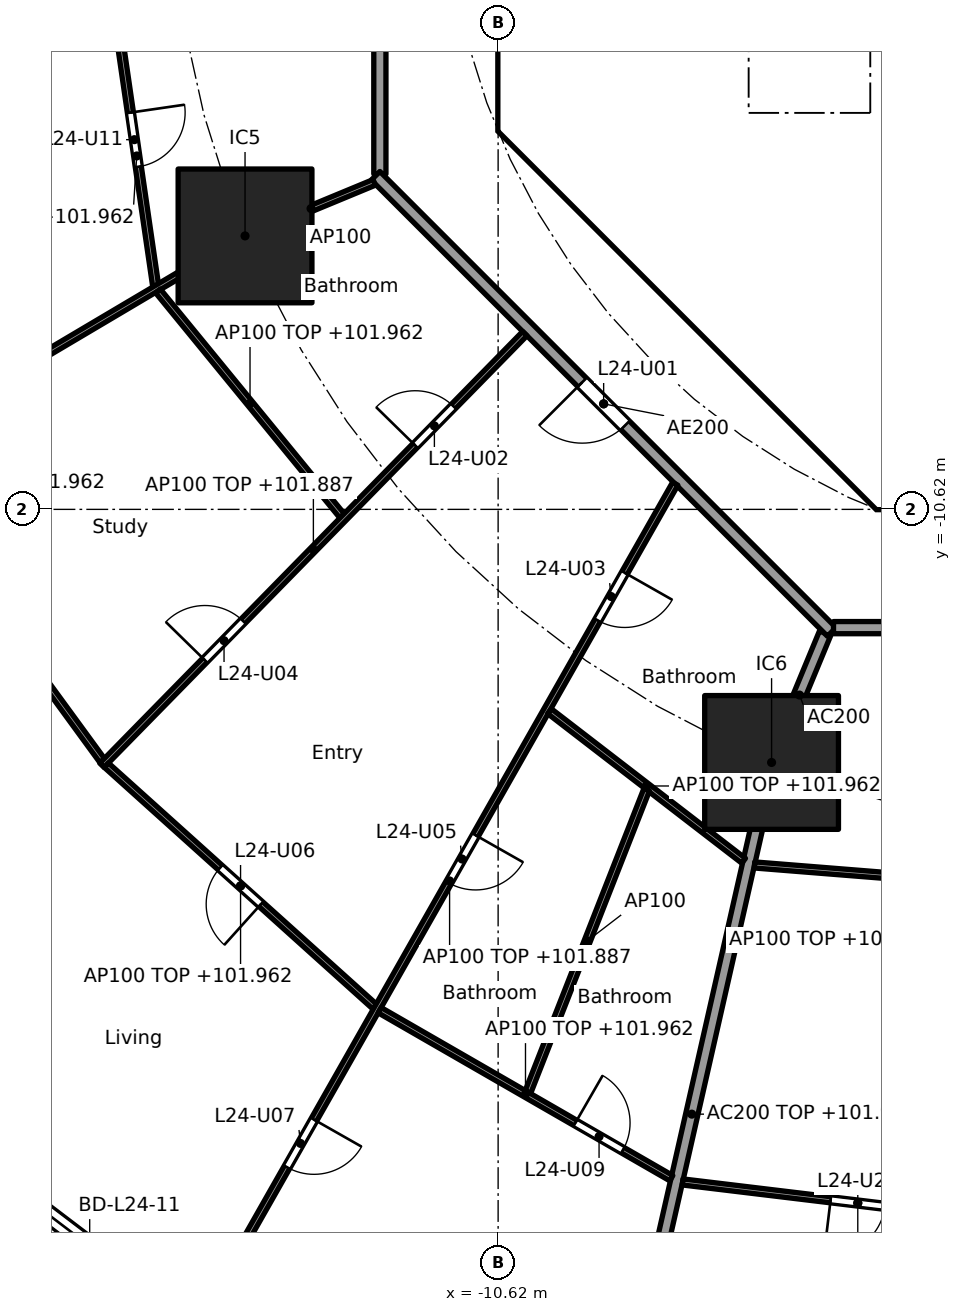
"""IFC4 building model, lengths in metres.
Left out: names, types, materials, properties, quantities, classifications, styles, units other than length and angle.
Written with IfcOpenShell. Run it as: python <this file> out.ifc"""

import sys

from ifc_helpers import new_model, si_unit, direction, frame, frame_2d, origin, origin_2d, place, context, subcontext, project, spatial, polyline, rectangle, outline, extrude, element, fill, save


model = new_model("IFC4")
c1 = context("Model", 3, precision=1e-05, world=origin(), true_north=direction((0.0, 1.0)))
c2 = subcontext(c1, "Body", "Model", "MODEL_VIEW")
j1 = project(units=[si_unit("LENGTHUNIT", "METRE"), si_unit("PLANEANGLEUNIT", "RADIAN")], contexts=[c1])
p1 = place(None, origin())
s1 = spatial("IfcSite", under=j1, at=p1, CompositionType="ELEMENT")
p2 = place(p1, origin())
s2 = spatial("IfcBuilding", under=s1, at=p2, CompositionType="ELEMENT")
p3 = place(p2, frame((0.0, 0.0, 99.2)))
s3 = spatial("IfcBuildingStorey", under=s2, at=p3, CompositionType="ELEMENT", Elevation=99.2)
for number, where, z_axis, x_axis in (
    (1, (-14.782, -6.123, 0.0), (0.0, 0.0, 1.0), (1.0, 0.0, 0.0)),
    (2, (-6.123, -14.782, 0.0), (0.0, 0.0, 1.0), (1.0, 0.0, 0.0)),
):
    element("IfcColumn", number, at=place(p3, frame(where, z_axis=z_axis, x_axis=x_axis)), inside=s3, PredefinedType="COLUMN", context=c2, shape_type="SweptSolid", body=[
        extrude(rectangle(XDim=2.2, YDim=2.2, at=origin_2d()), origin(), (0.0, 0.0, 1.0), 3.7),
    ])
p4 = place(p3, frame((-16.089, -23.682, 0.0), z_axis=(0.0, 0.0, 1.0), x_axis=(-0.796037575978, 0.605247203736, 0.0)))
e3 = element("IfcWall", 3, at=p4, inside=s3, PredefinedType="SOLIDWALL", context=c2, shape_type="SweptSolid", body=[
    extrude(rectangle(XDim=3.134, YDim=0.25, at=frame_2d((1.567, 0.0))), origin(), (0.0, 0.0, 1.0), 3.44),
])
p5 = place(p4, frame((0.517, 0.0, 0.0)))
e4 = element("IfcOpeningElement", 4, at=p5, cuts=e3, PredefinedType="OPENING", context=c2, shape_type="SweptSolid", body=[
    extrude(rectangle(XDim=2.1, YDim=2.4, at=frame_2d((1.05, 1.2))), frame((0.0, 0.135, 0.0), z_axis=(0.0, -1.0, 0.0), x_axis=(1.0, 0.0, 0.0)), (0.0, 0.0, 1.0), 0.27),
])
p6 = place(p3, frame((-10.325, 3.801, 0.0), z_axis=(0.0, 0.0, 1.0), x_axis=(0.0, -1.0, 0.0)))
e5 = element("IfcWall", 5, at=p6, inside=s3, PredefinedType="SHEAR", context=c2, shape_type="SweptSolid", body=[
    extrude(rectangle(XDim=7.602, YDim=0.6, at=frame_2d((3.801, 0.0))), origin(), (0.0, 0.0, 1.0), 3.44),
])
p7 = place(p6, frame((0.651, 0.0, 0.0)))
e6 = element("IfcOpeningElement", 6, at=p7, cuts=e5, PredefinedType="OPENING", context=c2, shape_type="SweptSolid", body=[
    extrude(rectangle(XDim=1.5, YDim=2.1, at=frame_2d((0.75, 1.05))), frame((0.0, 0.31, 0.0), z_axis=(0.0, -1.0, 0.0), x_axis=(1.0, 0.0, 0.0)), (0.0, 0.0, 1.0), 0.62),
])
p8 = place(p6, frame((5.451, 0.0, 0.0)))
e7 = element("IfcOpeningElement", 7, at=p8, cuts=e5, PredefinedType="OPENING", context=c2, shape_type="SweptSolid", body=[
    extrude(rectangle(XDim=1.5, YDim=2.1, at=frame_2d((0.75, 1.05))), frame((0.0, 0.31, 0.0), z_axis=(0.0, -1.0, 0.0), x_axis=(1.0, 0.0, 0.0)), (0.0, 0.0, 1.0), 0.62),
])
p9 = place(p3, frame((-9.988, -4.613, 0.0), z_axis=(0.0, 0.0, 1.0), x_axis=(0.707106781187, -0.707106781187, 0.0)))
e8 = element("IfcWall", 8, at=p9, inside=s3, PredefinedType="SHEAR", context=c2, shape_type="SweptSolid", body=[
    extrude(rectangle(XDim=7.602, YDim=0.6, at=frame_2d((3.801, 0.0))), origin(), (0.0, 0.0, 1.0), 3.44),
])
p10 = place(p9, frame((6.151, 0.0, 0.0)))
e9 = element("IfcOpeningElement", 9, at=p10, cuts=e8, PredefinedType="OPENING", context=c2, shape_type="SweptSolid", body=[
    extrude(rectangle(XDim=1.1, YDim=2.1, at=frame_2d((0.55, 1.05))), frame((0.0, 0.31, 0.0), z_axis=(0.0, -1.0, 0.0), x_axis=(1.0, 0.0, 0.0)), (0.0, 0.0, 1.0), 0.62),
])
p11 = place(p3, frame((-7.4, -6.627, 0.0), z_axis=(0.0, 0.0, 1.0), x_axis=(0.0, 1.0, 0.0)))
e10 = element("IfcWall", 10, at=p11, inside=s3, PredefinedType="PARTITIONING", context=c2, shape_type="SweptSolid", body=[
    extrude(rectangle(XDim=2.527, YDim=0.15, at=frame_2d((1.263, 0.0))), origin(), (0.0, 0.0, 1.0), 3.44),
])
p12 = place(p11, frame((0.776, 0.0, 0.0)))
e11 = element("IfcOpeningElement", 11, at=p12, cuts=e10, PredefinedType="OPENING", context=c2, shape_type="SweptSolid", body=[
    extrude(rectangle(XDim=0.9, YDim=2.1, at=frame_2d((0.45, 1.05))), frame((0.0, 0.085, 0.0), z_axis=(0.0, -1.0, 0.0), x_axis=(1.0, 0.0, 0.0)), (0.0, 0.0, 1.0), 0.17),
])
p13 = place(p3, origin())
e12 = element("IfcWall", 12, at=p13, inside=s3, PredefinedType="SHEAR", context=c2, shape_type="SweptSolid", body=[
    extrude(outline(polyline([(-10.625, -3.801), (-10.025, -3.801), (-10.025, -4.152), (-9.776, -4.401), (-10.2, -4.825), (-10.625, -4.401), (-10.625, -3.801)])), origin(), (0.0, 0.0, 1.0), 3.44),
])
p14 = place(p3, origin())
e13 = element("IfcWall", 13, at=p14, inside=s3, PredefinedType="SHEAR", context=c2, shape_type="SweptSolid", body=[
    extrude(outline(polyline([(-4.152, -10.025), (4.152, -10.025), (4.401, -9.776), (4.825, -10.2), (4.401, -10.625), (-4.401, -10.625), (-4.825, -10.2), (-4.401, -9.776), (-4.152, -10.025)])), origin(), (0.0, 0.0, 1.0), 3.44),
])
p15 = place(p3, origin())
e14 = element("IfcWall", 14, at=p15, inside=s3, PredefinedType="SOLIDWALL", context=c2, shape_type="SweptSolid", body=[
    extrude(outline(polyline([(-6.7, -2.1), (-6.5, -2.1), (-6.5, -4.1), (-4.5, -4.1), (-4.5, -2.1), (-4.3, -2.1), (-4.3, -4.1), (-2.3, -4.1), (-2.3, -2.1), (-2.1, -2.1), (-2.1, -4.1), (-0.1, -4.1), (-0.1, -2.1), (0.1, -2.1), (0.1, -4.1), (2.1, -4.1), (2.1, -2.1), (2.3, -2.1), (2.3, -4.1), (4.3, -4.1), (4.3, -2.1), (4.5, -2.1), (4.5, -4.1), (6.5, -4.1), (6.5, -2.1), (6.7, -2.1), (6.7, -4.3), (-6.7, -4.3), (-6.7, -2.1)])), origin(), (0.0, 0.0, 1.0), 3.44),
])
p16 = place(p3, frame((-10.025, -4.0, 0.0), z_axis=(0.0, 0.0, 1.0), x_axis=(1.0, 0.0, 0.0)))
e15 = element("IfcWall", 15, at=p16, inside=s3, PredefinedType="PARTITIONING", context=c2, shape_type="SweptSolid", body=[
    extrude(rectangle(XDim=3.325, YDim=0.2, at=frame_2d((1.662, 0.0))), origin(), (0.0, 0.0, 1.0), 3.44),
])
p17 = place(p3, frame((-5.243, -12.657, 0.0), z_axis=(0.0, 0.0, 1.0), x_axis=(-0.382668627144, -0.923885664896, 0.0)))
e16 = element("IfcWall", 16, at=p17, inside=s3, PredefinedType="PARTITIONING", context=c2, shape_type="SweptSolid", body=[
    extrude(rectangle(XDim=2.2, YDim=0.2, at=frame_2d((1.1, 0.0))), origin(), (0.0, 0.0, 1.0), 3.44),
])
p18 = place(p3, frame((-6.134, -14.831, 0.0), z_axis=(0.0, 0.0, 1.0), x_axis=(-0.221225405869, -0.975222702667, 0.0)))
e17 = element("IfcWall", 17, at=p18, inside=s3, PredefinedType="PARTITIONING", context=c2, shape_type="SweptSolid", body=[
    extrude(rectangle(XDim=11.761, YDim=0.2, at=frame_2d((5.88, 0.0))), origin(), (0.0, 0.0, 1.0), 2.762),
])
p19 = place(p3, frame((-12.565, 5.304, 0.0), z_axis=(0.0, 0.0, 1.0), x_axis=(0.0, -1.0, 0.0)))
e18 = element("IfcWall", 18, at=p19, inside=s3, PredefinedType="PARTITIONING", context=c2, shape_type="SweptSolid", body=[
    extrude(rectangle(XDim=10.409, YDim=0.2, at=frame_2d((5.205, 0.0))), origin(), (0.0, 0.0, 1.0), 3.44),
])
p20 = place(p3, frame((-12.635, -5.134, 0.0), z_axis=(0.0, 0.0, 1.0), x_axis=(0.707106781187, -0.707106781187, 0.0)))
e19 = element("IfcWall", 19, at=p20, inside=s3, PredefinedType="PARTITIONING", context=c2, shape_type="SweptSolid", body=[
    extrude(rectangle(XDim=10.609, YDim=0.2, at=frame_2d((5.305, 0.0))), origin(), (0.0, 0.0, 1.0), 3.44),
])
p21 = place(p20, frame((4.804, 0.0, 0.0)))
e20 = element("IfcOpeningElement", 20, at=p21, cuts=e19, PredefinedType="OPENING", context=c2, shape_type="SweptSolid", body=[
    extrude(rectangle(XDim=1.0, YDim=2.1, at=frame_2d((0.5, 1.05))), frame((0.0, 0.11, 0.0), z_axis=(0.0, -1.0, 0.0), x_axis=(1.0, 0.0, 0.0)), (0.0, 0.0, 1.0), 0.22),
])
p22 = place(p3, frame((-5.104, -12.565, 0.0), z_axis=(0.0, 0.0, 1.0), x_axis=(1.0, 0.0, 0.0)))
e21 = element("IfcWall", 21, at=p22, inside=s3, PredefinedType="PARTITIONING", context=c2, shape_type="SweptSolid", body=[
    extrude(rectangle(XDim=10.409, YDim=0.2, at=frame_2d((5.205, 0.0))), origin(), (0.0, 0.0, 1.0), 3.44),
])
p23 = place(p3, frame((-16.874, -2.677, 0.0), z_axis=(0.0, 0.0, 1.0), x_axis=(0.144260658133, -0.989539722555, 0.0)))
e22 = element("IfcWall", 22, at=p23, inside=s3, PredefinedType="PARTITIONING", context=c2, shape_type="SweptSolid", body=[
    extrude(rectangle(XDim=4.309, YDim=0.1, at=frame_2d((2.154, 0.0))), origin(), (0.0, 0.0, 1.0), 2.762),
])
p24 = place(p23, frame((1.434, 0.0, 0.0)))
e23 = element("IfcOpeningElement", 23, at=p24, cuts=e22, PredefinedType="OPENING", context=c2, shape_type="SweptSolid", body=[
    extrude(rectangle(XDim=0.9, YDim=2.1, at=frame_2d((0.45, 1.05))), frame((0.0, 0.06, 0.0), z_axis=(0.0, -1.0, 0.0), x_axis=(1.0, 0.0, 0.0)), (0.0, 0.0, 1.0), 0.12),
])
p25 = place(p3, frame((-12.657, -5.243, 0.0), z_axis=(0.0, 0.0, 1.0), x_axis=(-0.923848837015, -0.382757529444, 0.0)))
e24 = element("IfcWall", 24, at=p25, inside=s3, PredefinedType="PARTITIONING", context=c2, shape_type="SweptSolid", body=[
    extrude(rectangle(XDim=2.25, YDim=0.1, at=frame_2d((1.125, 0.0))), origin(), (0.0, 0.0, 1.0), 3.44),
])
p26 = place(p3, frame((-14.825, -6.148, 0.0), z_axis=(0.0, 0.0, 1.0), x_axis=(-0.860400431487, -0.509618580408, 0.0)))
e25 = element("IfcWall", 25, at=p26, inside=s3, PredefinedType="PARTITIONING", context=c2, shape_type="SweptSolid", body=[
    extrude(rectangle(XDim=11.688, YDim=0.1, at=frame_2d((5.844, 0.0))), origin(), (0.0, 0.0, 1.0), 2.762),
])
p27 = place(p26, frame((3.858, 0.0, 0.0)))
e26 = element("IfcOpeningElement", 26, at=p27, cuts=e25, PredefinedType="OPENING", context=c2, shape_type="SweptSolid", body=[
    extrude(rectangle(XDim=0.9, YDim=2.1, at=frame_2d((0.45, 1.05))), frame((0.0, 0.06, 0.0), z_axis=(0.0, -1.0, 0.0), x_axis=(1.0, 0.0, 0.0)), (0.0, 0.0, 1.0), 0.12),
])
p28 = place(p26, frame((8.877, 0.0, 0.0)))
e27 = element("IfcOpeningElement", 27, at=p28, cuts=e25, PredefinedType="OPENING", context=c2, shape_type="SweptSolid", body=[
    extrude(rectangle(XDim=0.9, YDim=2.1, at=frame_2d((0.45, 1.05))), frame((0.0, 0.06, 0.0), z_axis=(0.0, -1.0, 0.0), x_axis=(1.0, 0.0, 0.0)), (0.0, 0.0, 1.0), 0.12),
])
p29 = place(p3, frame((-16.214, -7.028, 0.0), z_axis=(0.0, 0.0, 1.0), x_axis=(0.633396341139, -0.773827548639, 0.0)))
e28 = element("IfcWall", 28, at=p29, inside=s3, PredefinedType="PARTITIONING", context=c2, shape_type="SweptSolid", body=[
    extrude(rectangle(XDim=4.779, YDim=0.1, at=frame_2d((2.39, 0.0))), origin(), (0.0, 0.0, 1.0), 2.762),
])
p30 = place(p3, frame((-20.79, -9.739, 0.0), z_axis=(0.0, 0.0, 1.0), x_axis=(0.589611246748, -0.807687178126, 0.0)))
e29 = element("IfcWall", 29, at=p30, inside=s3, PredefinedType="PARTITIONING", context=c2, shape_type="SweptSolid", body=[
    extrude(rectangle(XDim=6.208, YDim=0.1, at=frame_2d((3.104, 0.0))), origin(), (0.0, 0.0, 1.0), 2.762),
])
p31 = place(p3, frame((-10.181, -7.729, 0.0), z_axis=(0.0, 0.0, 1.0), x_axis=(-0.699710752188, -0.714426247609, 0.0)))
e30 = element("IfcWall", 30, at=p31, inside=s3, PredefinedType="PARTITIONING", context=c2, shape_type="SweptSolid", body=[
    extrude(rectangle(XDim=9.938, YDim=0.1, at=frame_2d((4.969, 0.0))), origin(), (0.0, 0.0, 1.0), 2.687),
])
p32 = place(p31, frame((1.675, 0.0, 0.0)))
e31 = element("IfcOpeningElement", 31, at=p32, cuts=e30, PredefinedType="OPENING", context=c2, shape_type="SweptSolid", body=[
    extrude(rectangle(XDim=0.9, YDim=2.1, at=frame_2d((0.45, 1.05))), frame((0.0, 0.06, 0.0), z_axis=(0.0, -1.0, 0.0), x_axis=(1.0, 0.0, 0.0)), (0.0, 0.0, 1.0), 0.12),
])
p33 = place(p31, frame((6.619, 0.0, 0.0)))
e32 = element("IfcOpeningElement", 32, at=p33, cuts=e30, PredefinedType="OPENING", context=c2, shape_type="SweptSolid", body=[
    extrude(rectangle(XDim=0.9, YDim=2.1, at=frame_2d((0.45, 1.05))), frame((0.0, 0.06, 0.0), z_axis=(0.0, -1.0, 0.0), x_axis=(1.0, 0.0, 0.0)), (0.0, 0.0, 1.0), 0.12),
])
p34 = place(p3, frame((-17.063, -14.827, 0.0), z_axis=(0.0, 0.0, 1.0), x_axis=(0.743478142868, -0.668760234373, 0.0)))
e33 = element("IfcWall", 33, at=p34, inside=s3, PredefinedType="PARTITIONING", context=c2, shape_type="SweptSolid", body=[
    extrude(rectangle(XDim=5.937, YDim=0.1, at=frame_2d((2.969, 0.0))), origin(), (0.0, 0.0, 1.0), 2.762),
])
p35 = place(p34, frame((2.519, 0.0, 0.0)))
e34 = element("IfcOpeningElement", 34, at=p35, cuts=e33, PredefinedType="OPENING", context=c2, shape_type="SweptSolid", body=[
    extrude(rectangle(XDim=0.9, YDim=2.1, at=frame_2d((0.45, 1.05))), frame((0.0, 0.06, 0.0), z_axis=(0.0, -1.0, 0.0), x_axis=(1.0, 0.0, 0.0)), (0.0, 0.0, 1.0), 0.12),
])
p36 = place(p3, frame((-7.707, -10.198, 0.0), z_axis=(0.0, 0.0, 1.0), x_axis=(-0.49395524734, -0.869487328042, 0.0)))
e35 = element("IfcWall", 35, at=p36, inside=s3, PredefinedType="PARTITIONING", context=c2, shape_type="SweptSolid", body=[
    extrude(rectangle(XDim=15.025, YDim=0.1, at=frame_2d((7.512, 0.0))), origin(), (0.0, 0.0, 1.0), 2.687),
])
p37 = place(p36, frame((1.684, 0.0, 0.0)))
e36 = element("IfcOpeningElement", 36, at=p37, cuts=e35, PredefinedType="OPENING", context=c2, shape_type="SweptSolid", body=[
    extrude(rectangle(XDim=0.9, YDim=2.1, at=frame_2d((0.45, 1.05))), frame((0.0, 0.06, 0.0), z_axis=(0.0, -1.0, 0.0), x_axis=(1.0, 0.0, 0.0)), (0.0, 0.0, 1.0), 0.12),
])
p38 = place(p36, frame((6.648, 0.0, 0.0)))
e37 = element("IfcOpeningElement", 37, at=p38, cuts=e35, PredefinedType="OPENING", context=c2, shape_type="SweptSolid", body=[
    extrude(rectangle(XDim=0.9, YDim=2.1, at=frame_2d((0.45, 1.05))), frame((0.0, 0.06, 0.0), z_axis=(0.0, -1.0, 0.0), x_axis=(1.0, 0.0, 0.0)), (0.0, 0.0, 1.0), 0.12),
])
p39 = place(p36, frame((12.027, 0.0, 0.0)))
e38 = element("IfcOpeningElement", 38, at=p39, cuts=e35, PredefinedType="OPENING", context=c2, shape_type="SweptSolid", body=[
    extrude(rectangle(XDim=0.9, YDim=2.1, at=frame_2d((0.45, 1.05))), frame((0.0, 0.06, 0.0), z_axis=(0.0, -1.0, 0.0), x_axis=(1.0, 0.0, 0.0)), (0.0, 0.0, 1.0), 0.12),
])
p40 = place(p3, frame((-9.775, -13.939, 0.0), z_axis=(0.0, 0.0, 1.0), x_axis=(0.792162117554, -0.610310723741, 0.0)))
e39 = element("IfcWall", 39, at=p40, inside=s3, PredefinedType="PARTITIONING", context=c2, shape_type="SweptSolid", body=[
    extrude(rectangle(XDim=4.03, YDim=0.1, at=frame_2d((2.015, 0.0))), origin(), (0.0, 0.0, 1.0), 2.762),
])
p41 = place(p3, frame((-12.568, -18.856, 0.0), z_axis=(0.0, 0.0, 1.0), x_axis=(0.866533437451, -0.499119025664, 0.0)))
e40 = element("IfcWall", 40, at=p41, inside=s3, PredefinedType="PARTITIONING", context=c2, shape_type="SweptSolid", body=[
    extrude(rectangle(XDim=5.535, YDim=0.1, at=frame_2d((2.768, 0.0))), origin(), (0.0, 0.0, 1.0), 2.762),
])
p42 = place(p41, frame((3.714, 0.0, 0.0)))
e41 = element("IfcOpeningElement", 41, at=p42, cuts=e40, PredefinedType="OPENING", context=c2, shape_type="SweptSolid", body=[
    extrude(rectangle(XDim=0.9, YDim=2.1, at=frame_2d((0.45, 1.05))), frame((0.0, 0.06, 0.0), z_axis=(0.0, -1.0, 0.0), x_axis=(1.0, 0.0, 0.0)), (0.0, 0.0, 1.0), 0.12),
])
p43 = place(p3, frame((-8.177, -15.231, 0.0), z_axis=(0.0, 0.0, 1.0), x_axis=(-0.365520869553, -0.930803144559, 0.0)))
e42 = element("IfcWall", 42, at=p43, inside=s3, PredefinedType="PARTITIONING", context=c2, shape_type="SweptSolid", body=[
    extrude(rectangle(XDim=5.342, YDim=0.1, at=frame_2d((2.671, 0.0))), origin(), (0.0, 0.0, 1.0), 3.44),
])
p44 = place(p3, frame((-6.404, -16.468, 0.0), z_axis=(0.0, 0.0, 1.0), x_axis=(0.996817253426, -0.079720532316, 0.0)))
e43 = element("IfcWall", 43, at=p44, inside=s3, PredefinedType="PARTITIONING", context=c2, shape_type="SweptSolid", body=[
    extrude(rectangle(XDim=4.716, YDim=0.1, at=frame_2d((2.358, 0.0))), origin(), (0.0, 0.0, 1.0), 2.762),
])
p45 = place(p3, frame((-7.586, -21.68, 0.0), z_axis=(0.0, 0.0, 1.0), x_axis=(0.992810189026, -0.119699325668, 0.0)))
e44 = element("IfcWall", 44, at=p45, inside=s3, PredefinedType="PARTITIONING", context=c2, shape_type="SweptSolid", body=[
    extrude(rectangle(XDim=5.803, YDim=0.1, at=frame_2d((2.901, 0.0))), origin(), (0.0, 0.0, 1.0), 2.762),
])
p46 = place(p45, frame((2.451, 0.0, 0.0)))
e45 = element("IfcOpeningElement", 45, at=p46, cuts=e44, PredefinedType="OPENING", context=c2, shape_type="SweptSolid", body=[
    extrude(rectangle(XDim=0.9, YDim=2.1, at=frame_2d((0.45, 1.05))), frame((0.0, 0.06, 0.0), z_axis=(0.0, -1.0, 0.0), x_axis=(1.0, 0.0, 0.0)), (0.0, 0.0, 1.0), 0.12),
])
p47 = place(p5, origin())
e46 = element("IfcDoor", 46, at=p47, inside=s3, OperationType="SLIDING_TO_LEFT", PredefinedType="DOOR", context=c2, shape_type="SweptSolid", body=[
    extrude(rectangle(XDim=2.1, YDim=2.4, at=frame_2d((1.05, 1.2))), frame((0.0, 0.025, 0.0), z_axis=(0.0, -1.0, 0.0), x_axis=(1.0, 0.0, 0.0)), (0.0, 0.0, 1.0), 0.05),
])
fill(e4, e46)
p48 = place(p12, origin())
e47 = element("IfcDoor", 47, at=p48, inside=s3, OperationType="SINGLE_SWING_LEFT", PredefinedType="DOOR", context=c2, shape_type="SweptSolid", body=[
    extrude(rectangle(XDim=0.9, YDim=2.1, at=frame_2d((0.45, 1.05))), frame((0.0, 0.025, 0.0), z_axis=(0.0, -1.0, 0.0), x_axis=(1.0, 0.0, 0.0)), (0.0, 0.0, 1.0), 0.05),
])
fill(e11, e47)
p49 = place(p8, origin())
e48 = element("IfcDoor", 48, at=p49, inside=s3, OperationType="DOUBLE_DOOR_SINGLE_SWING", PredefinedType="DOOR", context=c2, shape_type="SweptSolid", body=[
    extrude(rectangle(XDim=1.5, YDim=2.1, at=frame_2d((0.75, 1.05))), frame((0.0, 0.025, 0.0), z_axis=(0.0, -1.0, 0.0), x_axis=(1.0, 0.0, 0.0)), (0.0, 0.0, 1.0), 0.05),
])
fill(e7, e48)
p50 = place(p10, origin())
e49 = element("IfcDoor", 49, at=p50, inside=s3, OperationType="SINGLE_SWING_LEFT", PredefinedType="DOOR", context=c2, shape_type="SweptSolid", body=[
    extrude(rectangle(XDim=1.1, YDim=2.1, at=frame_2d((0.55, 1.05))), frame((0.0, 0.025, 0.0), z_axis=(0.0, -1.0, 0.0), x_axis=(1.0, 0.0, 0.0)), (0.0, 0.0, 1.0), 0.05),
])
fill(e9, e49)
p51 = place(p21, frame((1.0, 0.0, 0.0), x_axis=(-1.0, 0.0, 0.0)))
e50 = element("IfcDoor", 50, at=p51, inside=s3, OperationType="SINGLE_SWING_RIGHT", PredefinedType="DOOR", context=c2, shape_type="SweptSolid", body=[
    extrude(rectangle(XDim=1.0, YDim=2.1, at=frame_2d((0.5, 1.05))), frame((0.0, 0.025, 0.0), z_axis=(0.0, -1.0, 0.0), x_axis=(1.0, 0.0, 0.0)), (0.0, 0.0, 1.0), 0.05),
])
fill(e20, e50)
p52 = place(p32, frame((0.9, 0.0, 0.0), x_axis=(-1.0, 0.0, 0.0)))
e51 = element("IfcDoor", 51, at=p52, inside=s3, OperationType="SINGLE_SWING_LEFT", PredefinedType="DOOR", context=c2, shape_type="SweptSolid", body=[
    extrude(rectangle(XDim=0.9, YDim=2.1, at=frame_2d((0.45, 1.05))), frame((0.0, 0.025, 0.0), z_axis=(0.0, -1.0, 0.0), x_axis=(1.0, 0.0, 0.0)), (0.0, 0.0, 1.0), 0.05),
])
fill(e31, e51)
p53 = place(p37, origin())
e52 = element("IfcDoor", 52, at=p53, inside=s3, OperationType="SINGLE_SWING_LEFT", PredefinedType="DOOR", context=c2, shape_type="SweptSolid", body=[
    extrude(rectangle(XDim=0.9, YDim=2.1, at=frame_2d((0.45, 1.05))), frame((0.0, 0.025, 0.0), z_axis=(0.0, -1.0, 0.0), x_axis=(1.0, 0.0, 0.0)), (0.0, 0.0, 1.0), 0.05),
])
fill(e36, e52)
p54 = place(p33, frame((0.9, 0.0, 0.0), x_axis=(-1.0, 0.0, 0.0)))
e53 = element("IfcDoor", 53, at=p54, inside=s3, OperationType="SINGLE_SWING_LEFT", PredefinedType="DOOR", context=c2, shape_type="SweptSolid", body=[
    extrude(rectangle(XDim=0.9, YDim=2.1, at=frame_2d((0.45, 1.05))), frame((0.0, 0.025, 0.0), z_axis=(0.0, -1.0, 0.0), x_axis=(1.0, 0.0, 0.0)), (0.0, 0.0, 1.0), 0.05),
])
fill(e32, e53)
p55 = place(p38, origin())
e54 = element("IfcDoor", 54, at=p55, inside=s3, OperationType="SINGLE_SWING_LEFT", PredefinedType="DOOR", context=c2, shape_type="SweptSolid", body=[
    extrude(rectangle(XDim=0.9, YDim=2.1, at=frame_2d((0.45, 1.05))), frame((0.0, 0.025, 0.0), z_axis=(0.0, -1.0, 0.0), x_axis=(1.0, 0.0, 0.0)), (0.0, 0.0, 1.0), 0.05),
])
fill(e37, e54)
p56 = place(p35, frame((0.9, 0.0, 0.0), x_axis=(-1.0, 0.0, 0.0)))
e55 = element("IfcDoor", 55, at=p56, inside=s3, OperationType="SINGLE_SWING_LEFT", PredefinedType="DOOR", context=c2, shape_type="SweptSolid", body=[
    extrude(rectangle(XDim=0.9, YDim=2.1, at=frame_2d((0.45, 1.05))), frame((0.0, 0.025, 0.0), z_axis=(0.0, -1.0, 0.0), x_axis=(1.0, 0.0, 0.0)), (0.0, 0.0, 1.0), 0.05),
])
fill(e34, e55)
p57 = place(p39, origin())
e56 = element("IfcDoor", 56, at=p57, inside=s3, OperationType="SINGLE_SWING_LEFT", PredefinedType="DOOR", context=c2, shape_type="SweptSolid", body=[
    extrude(rectangle(XDim=0.9, YDim=2.1, at=frame_2d((0.45, 1.05))), frame((0.0, 0.025, 0.0), z_axis=(0.0, -1.0, 0.0), x_axis=(1.0, 0.0, 0.0)), (0.0, 0.0, 1.0), 0.05),
])
fill(e38, e56)
p58 = place(p42, origin())
e57 = element("IfcDoor", 57, at=p58, inside=s3, OperationType="SINGLE_SWING_LEFT", PredefinedType="DOOR", context=c2, shape_type="SweptSolid", body=[
    extrude(rectangle(XDim=0.9, YDim=2.1, at=frame_2d((0.45, 1.05))), frame((0.0, 0.025, 0.0), z_axis=(0.0, -1.0, 0.0), x_axis=(1.0, 0.0, 0.0)), (0.0, 0.0, 1.0), 0.05),
])
fill(e41, e57)
p59 = place(p24, origin())
e58 = element("IfcDoor", 58, at=p59, inside=s3, OperationType="SINGLE_SWING_LEFT", PredefinedType="DOOR", context=c2, shape_type="SweptSolid", body=[
    extrude(rectangle(XDim=0.9, YDim=2.1, at=frame_2d((0.45, 1.05))), frame((0.0, 0.025, 0.0), z_axis=(0.0, -1.0, 0.0), x_axis=(1.0, 0.0, 0.0)), (0.0, 0.0, 1.0), 0.05),
])
fill(e23, e58)
p60 = place(p46, frame((0.9, 0.0, 0.0), x_axis=(-1.0, 0.0, 0.0)))
e59 = element("IfcDoor", 59, at=p60, inside=s3, OperationType="SINGLE_SWING_RIGHT", PredefinedType="DOOR", context=c2, shape_type="SweptSolid", body=[
    extrude(rectangle(XDim=0.9, YDim=2.1, at=frame_2d((0.45, 1.05))), frame((0.0, 0.025, 0.0), z_axis=(0.0, -1.0, 0.0), x_axis=(1.0, 0.0, 0.0)), (0.0, 0.0, 1.0), 0.05),
])
fill(e45, e59)
save(model, sys.argv[1])
